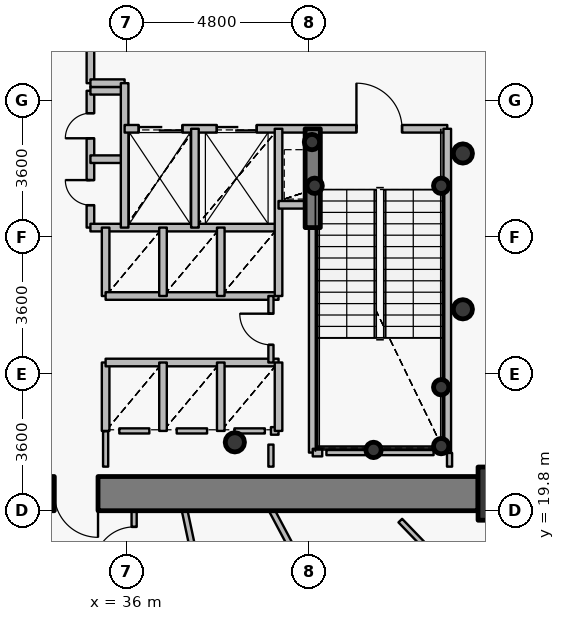
"""IFC4 building model, lengths in metres.
Left out: names, types, materials, properties, quantities, classifications, styles, units other than length and angle.
Written with IfcOpenShell. Run it as: python <this file> out.ifc"""

import sys

from ifc_helpers import new_model, si_unit, direction, frame, frame_2d, origin, origin_2d, place, context, subcontext, project, spatial, rectangle, hollow_circle, extrude, source, transform, mapped, element, fill, save


model = new_model("IFC4")
c1 = context("Model", 3, precision=1e-05, world=origin(), true_north=direction((0.0, 1.0)))
c2 = subcontext(c1, "Body", "Model", "MODEL_VIEW")
j1 = project(units=[si_unit("LENGTHUNIT", "METRE"), si_unit("PLANEANGLEUNIT", "RADIAN")], contexts=[c1])
p1 = place(None, origin())
s1 = spatial("IfcSite", under=j1, at=p1, CompositionType="ELEMENT")
p2 = place(p1, origin())
s2 = spatial("IfcBuilding", under=s1, at=p2, CompositionType="ELEMENT")
p3 = place(p2, frame((0.0, 0.0, 18.6)))
s3 = spatial("IfcBuildingStorey", under=s2, at=p3, CompositionType="ELEMENT", Elevation=18.6)
p4 = place(p3, frame((45.95, 20.25, 0.0), z_axis=(0.0, 0.0, 1.0), x_axis=(1.0, 0.0, 0.0)))
e1 = element("IfcColumn", 1, at=p4, inside=s3, PredefinedType="COLUMN", context=c2, shape_type="SweptSolid", body=[
    extrude(rectangle(XDim=1.4, YDim=1.4, at=origin_2d()), origin(), (0.0, 0.0, 1.0), 4.2),
])
p5 = place(p3, frame((38.85, 21.6, 0.0), z_axis=(0.0, 0.0, 1.0), x_axis=(1.0, 0.0, 0.0)))
e2 = element("IfcColumn", 2, at=p5, inside=s3, PredefinedType="COLUMN", context=c2, shape_type="SweptSolid", body=[
    extrude(hollow_circle(Radius=0.254, WallThickness=0.02, at=origin_2d()), origin(), (0.0, 0.0, 1.0), 4.2),
])
for number, where, z_axis, x_axis in (
    (3, (44.28, 21.5, 0.0), (0.0, 0.0, 1.0), (1.0, 0.0, 0.0)),
    (4, (44.28, 23.05, 0.0), (0.0, 0.0, 1.0), (1.0, 0.0, 0.0)),
    (5, (42.5, 21.4, 0.0), (0.0, 0.0, 1.0), (1.0, 0.0, 0.0)),
    (6, (40.95, 28.35, 0.0), (0.0, 0.0, 1.0), (1.0, 0.0, 0.0)),
    (7, (44.28, 28.35, 0.0), (0.0, 0.0, 1.0), (1.0, 0.0, 0.0)),
    (8, (40.88, 29.5, 0.0), (0.0, 0.0, 1.0), (1.0, 0.0, 0.0)),
):
    element("IfcColumn", number, at=place(p3, frame(where, z_axis=z_axis, x_axis=x_axis)), inside=s3, PredefinedType="COLUMN", context=c2, shape_type="SweptSolid", body=[
        extrude(hollow_circle(Radius=0.203, WallThickness=0.016, at=origin_2d()), origin(), (0.0, 0.0, 1.0), 4.2),
    ])
p6 = place(p3, frame((45.25, 20.25, 0.0), z_axis=(0.0, 0.0, 1.0), x_axis=(-1.0, 0.0, 0.0)))
e9 = element("IfcWall", 9, at=p6, inside=s3, PredefinedType="SHEAR", context=c2, shape_type="SweptSolid", body=[
    extrude(rectangle(XDim=18.5, YDim=0.9, at=frame_2d((9.25, 0.0))), origin(), (0.0, 0.0, 1.0), 3.35),
])
p7 = place(p6, frame((10.0, 0.0, 0.0)))
e10 = element("IfcOpeningElement", 10, at=p7, cuts=e9, PredefinedType="OPENING", context=c2, shape_type="SweptSolid", body=[
    extrude(rectangle(XDim=1.15, YDim=2.15, at=origin_2d()), frame((0.575, 0.46, 1.075), z_axis=(0.0, -1.0, 0.0), x_axis=(1.0, 0.0, 0.0)), (0.0, 0.0, 1.0), 0.92),
])
p8 = place(p3, frame((40.9, 27.25, 0.0), z_axis=(0.0, 0.0, 1.0), x_axis=(0.0, 1.0, 0.0)))
e11 = element("IfcWall", 11, at=p8, inside=s3, PredefinedType="SHEAR", context=c2, shape_type="SweptSolid", body=[
    extrude(rectangle(XDim=2.6, YDim=0.4, at=frame_2d((1.3, 0.0))), origin(), (0.0, 0.0, 1.0), 3.5),
])
for number, where, z_axis, x_axis in (
    (12, (44.85, 25.1, 0.0), (0.0, 0.0, 1.0), (1.0, 0.0, 0.0)),
    (13, (44.85, 29.2, 0.0), (0.0, 0.0, 1.0), (1.0, 0.0, 0.0)),
):
    element("IfcColumn", number, at=place(p3, frame(where, z_axis=z_axis, x_axis=x_axis)), inside=s3, PredefinedType="COLUMN", context=c2, shape_type="SweptSolid", body=[
        extrude(hollow_circle(Radius=0.254, WallThickness=0.02, at=origin_2d()), origin(), (0.0, 0.0, 1.0), 4.2),
    ])
p9 = place(p3, frame((35.05, 27.25, 0.0), z_axis=(0.0, 0.0, 1.0), x_axis=(0.0, 1.0, 0.0)))
e14 = element("IfcWall", 14, at=p9, inside=s3, PredefinedType="PARTITIONING", context=c2, shape_type="SweptSolid", body=[
    extrude(rectangle(XDim=3.6, YDim=0.2, at=frame_2d((1.8, 0.0))), origin(), (0.0, 0.0, 1.0), 3.9),
])
p10 = place(p9, frame((0.59, 0.0, 0.0)))
e15 = element("IfcOpeningElement", 15, at=p10, cuts=e14, PredefinedType="OPENING", context=c2, shape_type="SweptSolid", body=[
    extrude(rectangle(XDim=0.66, YDim=2.05, at=origin_2d()), frame((0.33, 0.11, 1.025), z_axis=(0.0, -1.0, 0.0), x_axis=(1.0, 0.0, 0.0)), (0.0, 0.0, 1.0), 0.22),
])
p11 = place(p9, frame((2.35, 0.0, 0.0)))
e16 = element("IfcOpeningElement", 16, at=p11, cuts=e14, PredefinedType="OPENING", context=c2, shape_type="SweptSolid", body=[
    extrude(rectangle(XDim=0.66, YDim=2.05, at=origin_2d()), frame((0.33, 0.11, 1.025), z_axis=(0.0, -1.0, 0.0), x_axis=(1.0, 0.0, 0.0)), (0.0, 0.0, 1.0), 0.22),
])
p12 = place(p3, frame((35.05, 27.25, 0.0), z_axis=(0.0, 0.0, 1.0), x_axis=(1.0, 0.0, 0.0)))
e17 = element("IfcWall", 17, at=p12, inside=s3, PredefinedType="PARTITIONING", context=c2, shape_type="SweptSolid", body=[
    extrude(rectangle(XDim=4.95, YDim=0.2, at=frame_2d((2.475, 0.0))), origin(), (0.0, 0.0, 1.0), 3.485),
])
for number, where, z_axis, x_axis in (
    (18, (35.05, 29.05, 0.0), (0.0, 0.0, 1.0), (1.0, 0.0, 0.0)),
    (19, (35.05, 30.85, 0.0), (0.0, 0.0, 1.0), (1.0, 0.0, 0.0)),
):
    element("IfcWall", number, at=place(p3, frame(where, z_axis=z_axis, x_axis=x_axis)), inside=s3, PredefinedType="PARTITIONING", context=c2, shape_type="SweptSolid", body=[
        extrude(rectangle(XDim=0.9, YDim=0.2, at=frame_2d((0.45, 0.0))), origin(), (0.0, 0.0, 1.0), 3.9),
    ])
p13 = place(p3, frame((35.05, 31.05, 0.0), z_axis=(0.0, 0.0, 1.0), x_axis=(0.0, 1.0, 0.0)))
e20 = element("IfcWall", 20, at=p13, inside=s3, PredefinedType="PARTITIONING", context=c2, shape_type="SweptSolid", body=[
    extrude(rectangle(XDim=2.25, YDim=0.2, at=frame_2d((1.125, 0.0))), origin(), (0.0, 0.0, 1.0), 3.485),
])
p14 = place(p3, frame((35.05, 31.05, 0.0), z_axis=(0.0, 0.0, 1.0), x_axis=(1.0, 0.0, 0.0)))
e21 = element("IfcWall", 21, at=p14, inside=s3, PredefinedType="PARTITIONING", context=c2, shape_type="SweptSolid", body=[
    extrude(rectangle(XDim=0.9, YDim=0.2, at=frame_2d((0.45, 0.0))), origin(), (0.0, 0.0, 1.0), 3.9),
])
p15 = place(p3, frame((35.45, 21.9, 0.0), z_axis=(0.0, 0.0, 1.0), x_axis=(0.0, 1.0, 0.0)))
e22 = element("IfcWall", 22, at=p15, inside=s3, PredefinedType="PARTITIONING", context=c2, shape_type="SweptSolid", body=[
    extrude(rectangle(XDim=1.8, YDim=0.2, at=frame_2d((0.9, 0.0))), origin(), (0.0, 0.0, 1.0), 3.9),
])
p16 = place(p3, frame((35.45, 23.7, 0.0), z_axis=(0.0, 0.0, 1.0), x_axis=(1.0, 0.0, 0.0)))
e23 = element("IfcWall", 23, at=p16, inside=s3, PredefinedType="PARTITIONING", context=c2, shape_type="SweptSolid", body=[
    extrude(rectangle(XDim=4.55, YDim=0.2, at=frame_2d((2.275, 0.0))), origin(), (0.0, 0.0, 1.0), 3.485),
])
p17 = place(p3, frame((35.45, 25.45, 0.0), z_axis=(0.0, 0.0, 1.0), x_axis=(0.0, 1.0, 0.0)))
e24 = element("IfcWall", 24, at=p17, inside=s3, PredefinedType="PARTITIONING", context=c2, shape_type="SweptSolid", body=[
    extrude(rectangle(XDim=1.8, YDim=0.2, at=frame_2d((0.9, 0.0))), origin(), (0.0, 0.0, 1.0), 3.9),
])
p18 = place(p3, frame((35.45, 25.45, 0.0), z_axis=(0.0, 0.0, 1.0), x_axis=(1.0, 0.0, 0.0)))
e25 = element("IfcWall", 25, at=p18, inside=s3, PredefinedType="PARTITIONING", context=c2, shape_type="SweptSolid", body=[
    extrude(rectangle(XDim=4.55, YDim=0.2, at=frame_2d((2.275, 0.0))), origin(), (0.0, 0.0, 1.0), 3.485),
])
p19 = place(p3, frame((35.95, 27.25, 0.0), z_axis=(0.0, 0.0, 1.0), x_axis=(0.0, 1.0, 0.0)))
e26 = element("IfcWall", 26, at=p19, inside=s3, PredefinedType="PARTITIONING", context=c2, shape_type="SweptSolid", body=[
    extrude(rectangle(XDim=3.8, YDim=0.2, at=frame_2d((1.9, 0.0))), origin(), (0.0, 0.0, 1.0), 3.9),
])
p20 = place(p3, frame((35.95, 29.85, 0.0), z_axis=(0.0, 0.0, 1.0), x_axis=(1.0, 0.0, 0.0)))
e27 = element("IfcWall", 27, at=p20, inside=s3, PredefinedType="PARTITIONING", context=c2, shape_type="SweptSolid", body=[
    extrude(rectangle(XDim=8.49, YDim=0.2, at=frame_2d((4.245, 0.0))), origin(), (0.0, 0.0, 1.0), 3.485),
])
p21 = place(p20, frame((6.1, 0.0, 0.0)))
e28 = element("IfcOpeningElement", 28, at=p21, cuts=e27, PredefinedType="OPENING", context=c2, shape_type="SweptSolid", body=[
    extrude(rectangle(XDim=1.2, YDim=2.15, at=origin_2d()), frame((0.6, 0.11, 1.075), z_axis=(0.0, -1.0, 0.0), x_axis=(1.0, 0.0, 0.0)), (0.0, 0.0, 1.0), 0.22),
])
p22 = place(p20, frame((0.37, 0.0, 0.0)))
e29 = element("IfcOpeningElement", 29, at=p22, cuts=e27, PredefinedType="OPENING", context=c2, shape_type="SweptSolid", body=[
    extrude(rectangle(XDim=1.15, YDim=2.15, at=origin_2d()), frame((0.575, 0.11, 1.075), z_axis=(0.0, -1.0, 0.0), x_axis=(1.0, 0.0, 0.0)), (0.0, 0.0, 1.0), 0.22),
])
p23 = place(p20, frame((2.425, 0.0, 0.0)))
e30 = element("IfcOpeningElement", 30, at=p23, cuts=e27, PredefinedType="OPENING", context=c2, shape_type="SweptSolid", body=[
    extrude(rectangle(XDim=1.05, YDim=2.15, at=origin_2d()), frame((0.525, 0.11, 1.075), z_axis=(0.0, -1.0, 0.0), x_axis=(1.0, 0.0, 0.0)), (0.0, 0.0, 1.0), 0.22),
])
p24 = place(p3, frame((36.2, 17.9, 0.0), z_axis=(0.0, 0.0, 1.0), x_axis=(0.0, 1.0, 0.0)))
e31 = element("IfcWall", 31, at=p24, inside=s3, PredefinedType="PARTITIONING", context=c2, shape_type="SweptSolid", body=[
    extrude(rectangle(XDim=1.9, YDim=0.135, at=frame_2d((0.95, 0.0))), origin(), (0.0, 0.0, 1.0), 3.085),
])
p25 = place(p24, frame((0.425, 0.0, 0.0)))
e32 = element("IfcOpeningElement", 32, at=p25, cuts=e31, PredefinedType="OPENING", context=c2, shape_type="SweptSolid", body=[
    extrude(rectangle(XDim=1.05, YDim=2.15, at=origin_2d()), frame((0.525, 0.078, 1.075), z_axis=(0.0, -1.0, 0.0), x_axis=(1.0, 0.0, 0.0)), (0.0, 0.0, 1.0), 0.155),
])
for number, where, z_axis, x_axis in (
    (33, (36.96, 21.9, 0.0), (0.0, 0.0, 1.0), (0.0, 1.0, 0.0)),
    (34, (36.96, 25.45, 0.0), (0.0, 0.0, 1.0), (0.0, 1.0, 0.0)),
):
    element("IfcWall", number, at=place(p3, frame(where, z_axis=z_axis, x_axis=x_axis)), inside=s3, PredefinedType="PARTITIONING", context=c2, shape_type="SweptSolid", body=[
        extrude(rectangle(XDim=1.8, YDim=0.2, at=frame_2d((0.9, 0.0))), origin(), (0.0, 0.0, 1.0), 3.9),
    ])
p26 = place(p3, frame((37.531, 19.8, 0.0), z_axis=(0.0, 0.0, 1.0), x_axis=(0.207904603096, -0.978149107249, 0.0)))
e35 = element("IfcWall", 35, at=p26, inside=s3, PredefinedType="PARTITIONING", context=c2, shape_type="SweptSolid", body=[
    extrude(rectangle(XDim=18.724, YDim=0.15, at=frame_2d((9.362, 0.0))), origin(), (0.0, 0.0, 1.0), 3.285),
])
p27 = place(p26, frame((8.837, 0.0, 0.0)))
e36 = element("IfcOpeningElement", 36, at=p27, cuts=e35, PredefinedType="OPENING", context=c2, shape_type="SweptSolid", body=[
    extrude(rectangle(XDim=1.05, YDim=2.15, at=origin_2d()), frame((0.525, 0.085, 1.075), z_axis=(0.0, -1.0, 0.0), x_axis=(1.0, 0.0, 0.0)), (0.0, 0.0, 1.0), 0.17),
])
p28 = place(p3, frame((37.8, 27.25, 0.0), z_axis=(0.0, 0.0, 1.0), x_axis=(0.0, 1.0, 0.0)))
e37 = element("IfcWall", 37, at=p28, inside=s3, PredefinedType="PARTITIONING", context=c2, shape_type="SweptSolid", body=[
    extrude(rectangle(XDim=2.6, YDim=0.2, at=frame_2d((1.3, 0.0))), origin(), (0.0, 0.0, 1.0), 3.9),
])
for number, where, z_axis, x_axis in (
    (38, (38.48, 21.9, 0.0), (0.0, 0.0, 1.0), (0.0, 1.0, 0.0)),
    (39, (38.48, 25.45, 0.0), (0.0, 0.0, 1.0), (0.0, 1.0, 0.0)),
):
    element("IfcWall", number, at=place(p3, frame(where, z_axis=z_axis, x_axis=x_axis)), inside=s3, PredefinedType="PARTITIONING", context=c2, shape_type="SweptSolid", body=[
        extrude(rectangle(XDim=1.8, YDim=0.2, at=frame_2d((0.9, 0.0))), origin(), (0.0, 0.0, 1.0), 3.9),
    ])
p29 = place(p3, frame((39.8, 21.9, 0.0), z_axis=(0.0, 0.0, 1.0), x_axis=(1.0, 0.0, 0.0)))
e40 = element("IfcWall", 40, at=p29, inside=s3, PredefinedType="PARTITIONING", context=c2, shape_type="SweptSolid", body=[
    extrude(rectangle(XDim=0.2, YDim=0.2, at=frame_2d((0.1, 0.0))), origin(), (0.0, 0.0, 1.0), 3.9),
])
p30 = place(p3, frame((39.8, 23.7, 0.0), z_axis=(0.0, 0.0, 1.0), x_axis=(0.0, 1.0, 0.0)))
e41 = element("IfcWall", 41, at=p30, inside=s3, PredefinedType="PARTITIONING", context=c2, shape_type="SweptSolid", body=[
    extrude(rectangle(XDim=1.75, YDim=0.135, at=frame_2d((0.875, 0.0))), origin(), (0.0, 0.0, 1.0), 3.9),
])
p31 = place(p30, frame((0.465, 0.0, 0.0)))
e42 = element("IfcOpeningElement", 42, at=p31, cuts=e41, PredefinedType="OPENING", context=c2, shape_type="SweptSolid", body=[
    extrude(rectangle(XDim=0.82, YDim=2.1, at=origin_2d()), frame((0.41, 0.078, 1.05), z_axis=(0.0, -1.0, 0.0), x_axis=(1.0, 0.0, 0.0)), (0.0, 0.0, 1.0), 0.155),
])
p32 = place(p3, frame((39.828, 19.8, 0.0), z_axis=(0.0, 0.0, 1.0), x_axis=(0.469463695446, -0.882951775953, 0.0)))
e43 = element("IfcWall", 43, at=p32, inside=s3, PredefinedType="PARTITIONING", context=c2, shape_type="SweptSolid", body=[
    extrude(rectangle(XDim=18.824, YDim=0.15, at=frame_2d((9.412, 0.0))), origin(), (0.0, 0.0, 1.0), 3.285),
])
p33 = place(p3, frame((40.0, 21.9, 0.0), z_axis=(0.0, 0.0, 1.0), x_axis=(0.0, 1.0, 0.0)))
e44 = element("IfcWall", 44, at=p33, inside=s3, PredefinedType="PARTITIONING", context=c2, shape_type="SweptSolid", body=[
    extrude(rectangle(XDim=1.8, YDim=0.2, at=frame_2d((0.9, 0.0))), origin(), (0.0, 0.0, 1.0), 3.9),
])
p34 = place(p3, frame((40.0, 25.45, 0.0), z_axis=(0.0, 0.0, 1.0), x_axis=(0.0, 1.0, 0.0)))
e45 = element("IfcWall", 45, at=p34, inside=s3, PredefinedType="PARTITIONING", context=c2, shape_type="SweptSolid", body=[
    extrude(rectangle(XDim=4.4, YDim=0.2, at=frame_2d((2.2, 0.0))), origin(), (0.0, 0.0, 1.0), 3.9),
])
p35 = place(p3, frame((40.0, 27.85, 0.0), z_axis=(0.0, 0.0, 1.0), x_axis=(1.0, 0.0, 0.0)))
e46 = element("IfcWall", 46, at=p35, inside=s3, PredefinedType="PARTITIONING", context=c2, shape_type="SweptSolid", body=[
    extrude(rectangle(XDim=0.9, YDim=0.2, at=frame_2d((0.45, 0.0))), origin(), (0.0, 0.0, 1.0), 3.9),
])
p36 = place(p3, frame((40.9, 21.33, 0.0), z_axis=(0.0, 0.0, 1.0), x_axis=(0.0, 1.0, 0.0)))
e47 = element("IfcWall", 47, at=p36, inside=s3, PredefinedType="PARTITIONING", context=c2, shape_type="SweptSolid", body=[
    extrude(rectangle(XDim=5.91, YDim=0.2, at=frame_2d((2.955, 0.0))), origin(), (0.0, 0.0, 1.0), 3.435),
])
p37 = place(p3, frame((40.9, 21.33, 0.0), z_axis=(0.0, 0.0, 1.0), x_axis=(1.0, 0.0, 0.0)))
e48 = element("IfcWall", 48, at=p37, inside=s3, PredefinedType="PARTITIONING", context=c2, shape_type="SweptSolid", body=[
    extrude(rectangle(XDim=0.25, YDim=0.2, at=frame_2d((0.125, 0.0))), origin(), (0.0, 0.0, 1.0), 3.435),
])
p38 = place(p3, frame((44.44, 21.33, 0.0), z_axis=(0.0, 0.0, 1.0), x_axis=(0.0, 1.0, 0.0)))
e49 = element("IfcWall", 49, at=p38, inside=s3, PredefinedType="PARTITIONING", context=c2, shape_type="SweptSolid", body=[
    extrude(rectangle(XDim=8.52, YDim=0.2, at=frame_2d((4.26, 0.0))), origin(), (0.0, 0.0, 1.0), 3.9),
])
p39 = place(p3, frame((44.08, 21.33, 0.0), z_axis=(0.0, 0.0, 1.0), x_axis=(-1.0, 0.0, 0.0)))
e50 = element("IfcWall", 50, at=p39, inside=s3, PredefinedType="PARTITIONING", context=c2, shape_type="SweptSolid", body=[
    extrude(rectangle(XDim=2.82, YDim=0.135, at=frame_2d((1.41, 0.0))), origin(), (0.0, 0.0, 1.0), 3.435),
])
p40 = place(p3, frame((36.6, 21.9, 0.0), z_axis=(0.0, 0.0, 1.0), x_axis=(-1.0, 0.0, 0.0)))
e51 = element("IfcWall", 51, at=p40, inside=s3, PredefinedType="PARTITIONING", context=c2, shape_type="SweptSolid", body=[
    extrude(rectangle(XDim=0.79, YDim=0.135, at=frame_2d((0.395, 0.0))), origin(), (0.0, 0.0, 1.0), 3.9),
])
p41 = place(p3, frame((38.12, 21.9, 0.0), z_axis=(0.0, 0.0, 1.0), x_axis=(-1.0, 0.0, 0.0)))
e52 = element("IfcWall", 52, at=p41, inside=s3, PredefinedType="PARTITIONING", context=c2, shape_type="SweptSolid", body=[
    extrude(rectangle(XDim=0.8, YDim=0.135, at=frame_2d((0.4, 0.0))), origin(), (0.0, 0.0, 1.0), 3.9),
])
p42 = place(p3, frame((39.64, 21.9, 0.0), z_axis=(0.0, 0.0, 1.0), x_axis=(-1.0, 0.0, 0.0)))
e53 = element("IfcWall", 53, at=p42, inside=s3, PredefinedType="PARTITIONING", context=c2, shape_type="SweptSolid", body=[
    extrude(rectangle(XDim=0.8, YDim=0.135, at=frame_2d((0.4, 0.0))), origin(), (0.0, 0.0, 1.0), 3.485),
])
p43 = place(p3, frame((39.8, 20.96, 0.0), z_axis=(0.0, 0.0, 1.0), x_axis=(0.0, 1.0, 0.0)))
e54 = element("IfcWall", 54, at=p43, inside=s3, PredefinedType="PARTITIONING", context=c2, shape_type="SweptSolid", body=[
    extrude(rectangle(XDim=0.58, YDim=0.135, at=frame_2d((0.29, 0.0))), origin(), (0.0, 0.0, 1.0), 3.435),
])
p44 = place(p3, frame((44.5, 20.96, 0.0), z_axis=(0.0, 0.0, 1.0), x_axis=(0.0, 1.0, 0.0)))
e55 = element("IfcWall", 55, at=p44, inside=s3, PredefinedType="PARTITIONING", context=c2, shape_type="SweptSolid", body=[
    extrude(rectangle(XDim=0.36, YDim=0.135, at=frame_2d((0.18, 0.0))), origin(), (0.0, 0.0, 1.0), 3.9),
])
p45 = place(p3, frame((35.45, 21.89, 0.0), z_axis=(0.0, 0.0, 1.0), x_axis=(0.0, -1.0, 0.0)))
e56 = element("IfcWall", 56, at=p45, inside=s3, PredefinedType="PARTITIONING", context=c2, shape_type="SweptSolid", body=[
    extrude(rectangle(XDim=0.93, YDim=0.135, at=frame_2d((0.465, 0.0))), origin(), (0.0, 0.0, 1.0), 3.485),
])
p46 = place(p3, frame((43.204, 19.54, 0.0), z_axis=(0.0, 0.0, 1.0), x_axis=(0.694638628507, -0.719358864397, 0.0)))
e57 = element("IfcWall", 57, at=p46, inside=s3, PredefinedType="PARTITIONING", context=c2, shape_type="SweptSolid", body=[
    extrude(rectangle(XDim=3.654, YDim=0.135, at=frame_2d((1.827, 0.0))), origin(), (0.0, 0.0, 1.0), 3.9),
])
m1 = source(origin(), c2, "Body", "SweptSolid", [
    extrude(rectangle(XDim=1.15, YDim=2.15, at=origin_2d()), frame((0.575, 0.025, 1.075), z_axis=(0.0, -1.0, 0.0), x_axis=(1.0, 0.0, 0.0)), (0.0, 0.0, 1.0), 0.05),
])
p47 = place(p7, origin())
e58 = element("IfcDoor", 58, at=p47, inside=s3, OperationType="SINGLE_SWING_LEFT", PredefinedType="DOOR", context=c2, shape_type="MappedRepresentation", body=[
    mapped(m1, transform((0.0, 0.0, 0.0), x_axis=(1.0, 0.0, 0.0), y_axis=(0.0, 1.0, 0.0), z_axis=(0.0, 0.0, 1.0), scale=1.0)),
])
fill(e10, e58)
m2 = source(origin(), c2, "Body", "SweptSolid", [
    extrude(rectangle(XDim=1.2, YDim=2.15, at=origin_2d()), frame((0.6, 0.025, 1.075), z_axis=(0.0, -1.0, 0.0), x_axis=(1.0, 0.0, 0.0)), (0.0, 0.0, 1.0), 0.05),
])
p48 = place(p21, origin())
e59 = element("IfcDoor", 59, at=p48, inside=s3, OperationType="SINGLE_SWING_LEFT", PredefinedType="DOOR", context=c2, shape_type="MappedRepresentation", body=[
    mapped(m2, transform((0.0, 0.0, 0.0), x_axis=(1.0, 0.0, 0.0), y_axis=(0.0, 1.0, 0.0), z_axis=(0.0, 0.0, 1.0), scale=1.0)),
])
fill(e28, e59)
m3 = source(origin(), c2, "Body", "SweptSolid", [
    extrude(rectangle(XDim=1.15, YDim=2.15, at=origin_2d()), frame((0.575, 0.025, 1.075), z_axis=(0.0, -1.0, 0.0), x_axis=(1.0, 0.0, 0.0)), (0.0, 0.0, 1.0), 0.05),
])
p49 = place(p22, origin())
e60 = element("IfcDoor", 60, at=p49, inside=s3, OperationType="DOUBLE_DOOR_SLIDING", PredefinedType="USERDEFINED", context=c2, shape_type="MappedRepresentation", body=[
    mapped(m3, transform((0.0, 0.0, 0.0), x_axis=(1.0, 0.0, 0.0), y_axis=(0.0, 1.0, 0.0), z_axis=(0.0, 0.0, 1.0), scale=1.0)),
])
fill(e29, e60)
m4 = source(origin(), c2, "Body", "SweptSolid", [
    extrude(rectangle(XDim=1.05, YDim=2.15, at=origin_2d()), frame((0.525, 0.025, 1.075), z_axis=(0.0, -1.0, 0.0), x_axis=(1.0, 0.0, 0.0)), (0.0, 0.0, 1.0), 0.05),
])
p50 = place(p23, origin())
e61 = element("IfcDoor", 61, at=p50, inside=s3, OperationType="DOUBLE_DOOR_SLIDING", PredefinedType="USERDEFINED", context=c2, shape_type="MappedRepresentation", body=[
    mapped(m4, transform((0.0, 0.0, 0.0), x_axis=(1.0, 0.0, 0.0), y_axis=(0.0, 1.0, 0.0), z_axis=(0.0, 0.0, 1.0), scale=1.0)),
])
fill(e30, e61)
m5 = source(origin(), c2, "Body", "SweptSolid", [
    extrude(rectangle(XDim=0.66, YDim=2.05, at=origin_2d()), frame((0.33, 0.025, 1.025), z_axis=(0.0, -1.0, 0.0), x_axis=(1.0, 0.0, 0.0)), (0.0, 0.0, 1.0), 0.05),
])
p51 = place(p10, origin())
e62 = element("IfcDoor", 62, at=p51, inside=s3, OperationType="SINGLE_SWING_RIGHT", PredefinedType="USERDEFINED", context=c2, shape_type="MappedRepresentation", body=[
    mapped(m5, transform((0.0, 0.0, 0.0), x_axis=(1.0, 0.0, 0.0), y_axis=(0.0, 1.0, 0.0), z_axis=(0.0, 0.0, 1.0), scale=1.0)),
])
fill(e15, e62)
p52 = place(p11, origin())
e63 = element("IfcDoor", 63, at=p52, inside=s3, OperationType="SINGLE_SWING_LEFT", PredefinedType="USERDEFINED", context=c2, shape_type="MappedRepresentation", body=[
    mapped(m5, transform((0.0, 0.0, 0.0), x_axis=(1.0, 0.0, 0.0), y_axis=(0.0, 1.0, 0.0), z_axis=(0.0, 0.0, 1.0), scale=1.0)),
])
fill(e16, e63)
m6 = source(origin(), c2, "Body", "SweptSolid", [
    extrude(rectangle(XDim=0.82, YDim=2.1, at=origin_2d()), frame((0.41, 0.025, 1.05), z_axis=(0.0, -1.0, 0.0), x_axis=(1.0, 0.0, 0.0)), (0.0, 0.0, 1.0), 0.05),
])
p53 = place(p31, origin())
e64 = element("IfcDoor", 64, at=p53, inside=s3, OperationType="SINGLE_SWING_RIGHT", PredefinedType="DOOR", context=c2, shape_type="MappedRepresentation", body=[
    mapped(m6, transform((0.0, 0.0, 0.0), x_axis=(1.0, 0.0, 0.0), y_axis=(0.0, 1.0, 0.0), z_axis=(0.0, 0.0, 1.0), scale=1.0)),
])
fill(e42, e64)
m7 = source(origin(), c2, "Body", "SweptSolid", [
    extrude(rectangle(XDim=1.05, YDim=2.15, at=origin_2d()), frame((0.525, 0.025, 1.075), z_axis=(0.0, -1.0, 0.0), x_axis=(1.0, 0.0, 0.0)), (0.0, 0.0, 1.0), 0.05),
])
p54 = place(p25, origin())
e65 = element("IfcDoor", 65, at=p54, inside=s3, OperationType="SINGLE_SWING_LEFT", PredefinedType="DOOR", context=c2, shape_type="MappedRepresentation", body=[
    mapped(m7, transform((0.0, 0.0, 0.0), x_axis=(1.0, 0.0, 0.0), y_axis=(0.0, 1.0, 0.0), z_axis=(0.0, 0.0, 1.0), scale=1.0)),
])
fill(e32, e65)
save(model, sys.argv[1])
